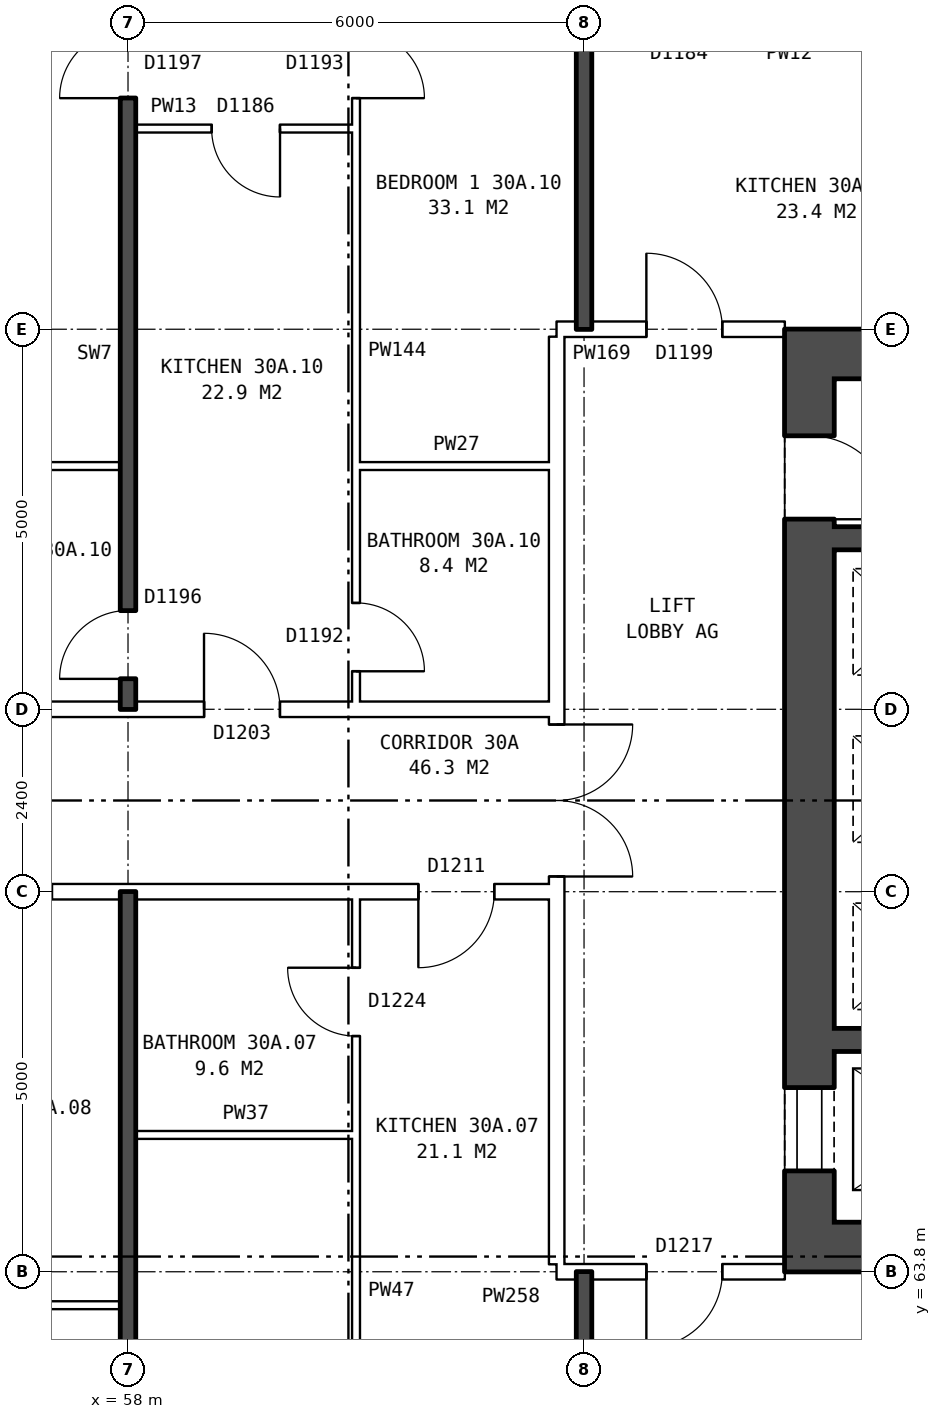
"""IFC4 building model, lengths in metres.
Left out: names, types, materials, properties, quantities, classifications, styles, units other than length and angle.
Written with IfcOpenShell. Run it as: python <this file> out.ifc"""

import sys

from ifc_helpers import new_model, si_unit, direction, frame, frame_2d, origin, place, context, subcontext, project, spatial, rectangle, extrude, element, fill, save


model = new_model("IFC4")
c1 = context("Model", 3, precision=1e-05, world=origin(), true_north=direction((0.0, 1.0)))
c2 = subcontext(c1, "Body", "Model", "MODEL_VIEW")
j1 = project(units=[si_unit("LENGTHUNIT", "METRE"), si_unit("PLANEANGLEUNIT", "RADIAN")], contexts=[c1])
p1 = place(None, origin())
s1 = spatial("IfcSite", under=j1, at=p1, CompositionType="ELEMENT")
p2 = place(p1, origin())
s2 = spatial("IfcBuilding", under=s1, at=p2, CompositionType="ELEMENT")
p3 = place(p2, frame((0.0, 0.0, 108.8)))
s3 = spatial("IfcBuildingStorey", under=s2, at=p3, CompositionType="ELEMENT", Elevation=108.8)
p4 = place(p3, frame((66.965, 64.45, 0.0), z_axis=(0.0, 0.0, 1.0), x_axis=(0.0, 1.0, 0.0)))
e1 = element("IfcWall", 1, at=p4, inside=s3, PredefinedType="SHEAR", context=c2, shape_type="SweptSolid", body=[
    extrude(rectangle(XDim=11.1, YDim=0.65, at=frame_2d((5.55, 0.0))), origin(), (0.0, 0.0, 1.0), 2.85),
])
p5 = place(p4, frame((0.675, 0.0, 0.0)))
e2 = element("IfcOpeningElement", 2, at=p5, cuts=e1, PredefinedType="OPENING", context=c2, shape_type="SweptSolid", body=[
    extrude(rectangle(XDim=1.1, YDim=2.1, at=frame_2d((0.55, 1.05))), frame((0.0, 0.335, 0.0), z_axis=(0.0, -1.0, 0.0), x_axis=(1.0, 0.0, 0.0)), (0.0, 0.0, 1.0), 0.67),
])
p6 = place(p4, frame((9.25, 0.0, 0.0)))
e3 = element("IfcOpeningElement", 3, at=p6, cuts=e1, PredefinedType="OPENING", context=c2, shape_type="SweptSolid", body=[
    extrude(rectangle(XDim=1.1, YDim=2.1, at=frame_2d((0.55, 1.05))), frame((0.0, 0.335, 0.0), z_axis=(0.0, -1.0, 0.0), x_axis=(1.0, 0.0, 0.0)), (0.0, 0.0, 1.0), 0.67),
])
for number, where, z_axis, x_axis in (
    (4, (66.64, 64.125, 0.0), (0.0, 0.0, 1.0), (1.0, 0.0, 0.0)),
    (5, (66.64, 75.875, 0.0), (0.0, 0.0, 1.0), (1.0, 0.0, 0.0)),
):
    element("IfcWall", number, at=place(p3, frame(where, z_axis=z_axis, x_axis=x_axis)), inside=s3, PredefinedType="SHEAR", context=c2, shape_type="SweptSolid", body=[
        extrude(rectangle(XDim=9.0, YDim=0.65, at=frame_2d((4.5, 0.0))), origin(), (0.0, 0.0, 1.0), 2.85),
    ])
p7 = place(p3, frame((67.29, 66.85, 0.0), z_axis=(0.0, 0.0, 1.0), x_axis=(1.0, 0.0, 0.0)))
e6 = element("IfcWall", 6, at=p7, inside=s3, PredefinedType="SHEAR", context=c2, shape_type="SweptSolid", body=[
    extrude(rectangle(XDim=3.37, YDim=0.3, at=frame_2d((1.685, 0.0))), origin(), (0.0, 0.0, 1.0), 2.85),
])
p8 = place(p3, frame((67.29, 73.45, 0.0), z_axis=(0.0, 0.0, 1.0), x_axis=(1.0, 0.0, 0.0)))
e7 = element("IfcWall", 7, at=p8, inside=s3, PredefinedType="SHEAR", context=c2, shape_type="SweptSolid", body=[
    extrude(rectangle(XDim=2.25, YDim=0.3, at=frame_2d((1.125, 0.0))), origin(), (0.0, 0.0, 1.0), 2.85),
])
p9 = place(p3, frame((63.64, 63.9, 0.0), z_axis=(0.0, 0.0, 1.0), x_axis=(0.0, 1.0, 0.0)))
e8 = element("IfcWall", 8, at=p9, inside=s3, PredefinedType="PARTITIONING", context=c2, shape_type="SweptSolid", body=[
    extrude(rectangle(XDim=12.2, YDim=0.2, at=frame_2d((6.1, 0.0))), origin(), (0.0, 0.0, 1.0), 2.85),
])
p10 = place(p9, frame((5.1, 0.0, 0.0)))
e9 = element("IfcOpeningElement", 9, at=p10, cuts=e8, PredefinedType="OPENING", context=c2, shape_type="SweptSolid", body=[
    extrude(rectangle(XDim=2.0, YDim=2.1, at=frame_2d((1.0, 1.05))), frame((0.0, 0.11, 0.0), z_axis=(0.0, -1.0, 0.0), x_axis=(1.0, 0.0, 0.0)), (0.0, 0.0, 1.0), 0.22),
])
p11 = place(p3, frame((55.0, 63.36, 0.0), z_axis=(0.0, 0.0, 1.0), x_axis=(1.0, 0.0, 0.0)))
e10 = element("IfcWall", 10, at=p11, inside=s3, PredefinedType="PARTITIONING", context=c2, shape_type="SweptSolid", body=[
    extrude(rectangle(XDim=2.9, YDim=0.1, at=frame_2d((1.45, 0.0))), origin(), (0.0, 0.0, 1.0), 2.85),
])
p12 = place(p11, frame((1.0, 0.0, 0.0)))
e11 = element("IfcOpeningElement", 11, at=p12, cuts=e10, PredefinedType="OPENING", context=c2, shape_type="SweptSolid", body=[
    extrude(rectangle(XDim=0.9, YDim=2.1, at=frame_2d((0.45, 1.05))), frame((0.0, 0.06, 0.0), z_axis=(0.0, -1.0, 0.0), x_axis=(1.0, 0.0, 0.0)), (0.0, 0.0, 1.0), 0.12),
])
p13 = place(p3, frame((63.64, 63.8, 0.0), z_axis=(0.0, 0.0, 1.0), x_axis=(1.0, 0.0, 0.0)))
e12 = element("IfcWall", 12, at=p13, inside=s3, PredefinedType="PARTITIONING", context=c2, shape_type="SweptSolid", body=[
    extrude(rectangle(XDim=3.0, YDim=0.2, at=frame_2d((1.5, 0.0))), origin(), (0.0, 0.0, 1.0), 2.85),
])
p14 = place(p13, frame((1.18, 0.0, 0.0)))
e13 = element("IfcOpeningElement", 13, at=p14, cuts=e12, PredefinedType="OPENING", context=c2, shape_type="SweptSolid", body=[
    extrude(rectangle(XDim=1.0, YDim=2.1, at=frame_2d((0.5, 1.05))), frame((0.0, 0.11, 0.0), z_axis=(0.0, -1.0, 0.0), x_axis=(1.0, 0.0, 0.0)), (0.0, 0.0, 1.0), 0.22),
])
p15 = place(p3, frame((58.1, 65.6, 0.0), z_axis=(0.0, 0.0, 1.0), x_axis=(1.0, 0.0, 0.0)))
e14 = element("IfcWall", 14, at=p15, inside=s3, PredefinedType="PARTITIONING", context=c2, shape_type="SweptSolid", body=[
    extrude(rectangle(XDim=2.9, YDim=0.1, at=frame_2d((1.45, 0.0))), origin(), (0.0, 0.0, 1.0), 2.85),
])
p16 = place(p3, frame((44.36, 68.8, 0.0), z_axis=(0.0, 0.0, 1.0), x_axis=(1.0, 0.0, 0.0)))
e15 = element("IfcWall", 15, at=p16, inside=s3, PredefinedType="PARTITIONING", context=c2, shape_type="SweptSolid", body=[
    extrude(rectangle(XDim=19.28, YDim=0.2, at=frame_2d((9.64, 0.0))), origin(), (0.0, 0.0, 1.0), 2.85),
])
p17 = place(p16, frame((17.46, 0.0, 0.0)))
e16 = element("IfcOpeningElement", 16, at=p17, cuts=e15, PredefinedType="OPENING", context=c2, shape_type="SweptSolid", body=[
    extrude(rectangle(XDim=1.0, YDim=2.1, at=frame_2d((0.5, 1.05))), frame((0.0, 0.11, 0.0), z_axis=(0.0, -1.0, 0.0), x_axis=(1.0, 0.0, 0.0)), (0.0, 0.0, 1.0), 0.22),
])
p18 = place(p16, frame((11.64, 0.0, 0.0)))
e17 = element("IfcOpeningElement", 17, at=p18, cuts=e15, PredefinedType="OPENING", context=c2, shape_type="SweptSolid", body=[
    extrude(rectangle(XDim=1.0, YDim=2.1, at=frame_2d((0.5, 1.05))), frame((0.0, 0.11, 0.0), z_axis=(0.0, -1.0, 0.0), x_axis=(1.0, 0.0, 0.0)), (0.0, 0.0, 1.0), 0.22),
])
p19 = place(p16, frame((2.64, 0.0, 0.0)))
e18 = element("IfcOpeningElement", 18, at=p19, cuts=e15, PredefinedType="OPENING", context=c2, shape_type="SweptSolid", body=[
    extrude(rectangle(XDim=1.0, YDim=2.1, at=frame_2d((0.5, 1.05))), frame((0.0, 0.11, 0.0), z_axis=(0.0, -1.0, 0.0), x_axis=(1.0, 0.0, 0.0)), (0.0, 0.0, 1.0), 0.22),
])
p20 = place(p3, frame((44.36, 71.2, 0.0), z_axis=(0.0, 0.0, 1.0), x_axis=(1.0, 0.0, 0.0)))
e19 = element("IfcWall", 19, at=p20, inside=s3, PredefinedType="PARTITIONING", context=c2, shape_type="SweptSolid", body=[
    extrude(rectangle(XDim=19.28, YDim=0.2, at=frame_2d((9.64, 0.0))), origin(), (0.0, 0.0, 1.0), 2.85),
])
p21 = place(p20, frame((14.64, 0.0, 0.0)))
e20 = element("IfcOpeningElement", 20, at=p21, cuts=e19, PredefinedType="OPENING", context=c2, shape_type="SweptSolid", body=[
    extrude(rectangle(XDim=1.0, YDim=2.1, at=frame_2d((0.5, 1.05))), frame((0.0, 0.11, 0.0), z_axis=(0.0, -1.0, 0.0), x_axis=(1.0, 0.0, 0.0)), (0.0, 0.0, 1.0), 0.22),
])
p22 = place(p20, frame((5.64, 0.0, 0.0)))
e21 = element("IfcOpeningElement", 21, at=p22, cuts=e19, PredefinedType="OPENING", context=c2, shape_type="SweptSolid", body=[
    extrude(rectangle(XDim=1.0, YDim=2.1, at=frame_2d((0.5, 1.05))), frame((0.0, 0.11, 0.0), z_axis=(0.0, -1.0, 0.0), x_axis=(1.0, 0.0, 0.0)), (0.0, 0.0, 1.0), 0.22),
])
p23 = place(p3, frame((55.1, 74.4, 0.0), z_axis=(0.0, 0.0, 1.0), x_axis=(1.0, 0.0, 0.0)))
e22 = element("IfcWall", 22, at=p23, inside=s3, PredefinedType="PARTITIONING", context=c2, shape_type="SweptSolid", body=[
    extrude(rectangle(XDim=2.8, YDim=0.1, at=frame_2d((1.4, 0.0))), origin(), (0.0, 0.0, 1.0), 2.85),
])
p24 = place(p3, frame((61.0, 74.4, 0.0), z_axis=(0.0, 0.0, 1.0), x_axis=(1.0, 0.0, 0.0)))
e23 = element("IfcWall", 23, at=p24, inside=s3, PredefinedType="PARTITIONING", context=c2, shape_type="SweptSolid", body=[
    extrude(rectangle(XDim=2.64, YDim=0.1, at=frame_2d((1.32, 0.0))), origin(), (0.0, 0.0, 1.0), 2.85),
])
p25 = place(p3, frame((63.64, 76.2, 0.0), z_axis=(0.0, 0.0, 1.0), x_axis=(1.0, 0.0, 0.0)))
e24 = element("IfcWall", 24, at=p25, inside=s3, PredefinedType="PARTITIONING", context=c2, shape_type="SweptSolid", body=[
    extrude(rectangle(XDim=3.0, YDim=0.2, at=frame_2d((1.5, 0.0))), origin(), (0.0, 0.0, 1.0), 2.85),
])
p26 = place(p25, frame((1.18, 0.0, 0.0)))
e25 = element("IfcOpeningElement", 25, at=p26, cuts=e24, PredefinedType="OPENING", context=c2, shape_type="SweptSolid", body=[
    extrude(rectangle(XDim=1.0, YDim=2.1, at=frame_2d((0.5, 1.05))), frame((0.0, 0.11, 0.0), z_axis=(0.0, -1.0, 0.0), x_axis=(1.0, 0.0, 0.0)), (0.0, 0.0, 1.0), 0.22),
])
p27 = place(p3, frame((58.1, 78.84, 0.0), z_axis=(0.0, 0.0, 1.0), x_axis=(1.0, 0.0, 0.0)))
e26 = element("IfcWall", 26, at=p27, inside=s3, PredefinedType="PARTITIONING", context=c2, shape_type="SweptSolid", body=[
    extrude(rectangle(XDim=2.9, YDim=0.1, at=frame_2d((1.45, 0.0))), origin(), (0.0, 0.0, 1.0), 2.85),
])
p28 = place(p27, frame((1.0, 0.0, 0.0)))
e27 = element("IfcOpeningElement", 27, at=p28, cuts=e26, PredefinedType="OPENING", context=c2, shape_type="SweptSolid", body=[
    extrude(rectangle(XDim=0.9, YDim=2.1, at=frame_2d((0.45, 1.05))), frame((0.0, 0.06, 0.0), z_axis=(0.0, -1.0, 0.0), x_axis=(1.0, 0.0, 0.0)), (0.0, 0.0, 1.0), 0.12),
])
p29 = place(p3, frame((58.0, 54.36, 0.0), z_axis=(0.0, 0.0, 1.0), x_axis=(0.0, 1.0, 0.0)))
e28 = element("IfcWall", 28, at=p29, inside=s3, PredefinedType="SOLIDWALL", context=c2, shape_type="SweptSolid", body=[
    extrude(rectangle(XDim=14.44, YDim=0.2, at=frame_2d((7.22, 0.0))), origin(), (0.0, 0.0, 1.0), 2.85),
])
p30 = place(p3, frame((58.0, 71.2, 0.0), z_axis=(0.0, 0.0, 1.0), x_axis=(0.0, 1.0, 0.0)))
e29 = element("IfcWall", 29, at=p30, inside=s3, PredefinedType="SOLIDWALL", context=c2, shape_type="SweptSolid", body=[
    extrude(rectangle(XDim=14.44, YDim=0.2, at=frame_2d((7.22, 0.0))), origin(), (0.0, 0.0, 1.0), 2.85),
])
p31 = place(p30, frame((8.04, 0.0, 0.0)))
e30 = element("IfcOpeningElement", 30, at=p31, cuts=e29, PredefinedType="OPENING", context=c2, shape_type="SweptSolid", body=[
    extrude(rectangle(XDim=0.9, YDim=2.1, at=frame_2d((0.45, 1.05))), frame((0.0, 0.11, 0.0), z_axis=(0.0, -1.0, 0.0), x_axis=(1.0, 0.0, 0.0)), (0.0, 0.0, 1.0), 0.22),
])
p32 = place(p30, frame((0.4, 0.0, 0.0)))
e31 = element("IfcOpeningElement", 31, at=p32, cuts=e29, PredefinedType="OPENING", context=c2, shape_type="SweptSolid", body=[
    extrude(rectangle(XDim=0.9, YDim=2.1, at=frame_2d((0.45, 1.05))), frame((0.0, 0.11, 0.0), z_axis=(0.0, -1.0, 0.0), x_axis=(1.0, 0.0, 0.0)), (0.0, 0.0, 1.0), 0.22),
])
p33 = place(p3, frame((61.0, 54.36, 0.0), z_axis=(0.0, 0.0, 1.0), x_axis=(0.0, 1.0, 0.0)))
e32 = element("IfcWall", 32, at=p33, inside=s3, PredefinedType="PARTITIONING", context=c2, shape_type="SweptSolid", body=[
    extrude(rectangle(XDim=14.34, YDim=0.1, at=frame_2d((7.17, 0.0))), origin(), (0.0, 0.0, 1.0), 2.85),
])
p34 = place(p33, frame((5.5, 0.0, 0.0)))
e33 = element("IfcOpeningElement", 33, at=p34, cuts=e32, PredefinedType="OPENING", context=c2, shape_type="SweptSolid", body=[
    extrude(rectangle(XDim=0.9, YDim=2.1, at=frame_2d((0.45, 1.05))), frame((0.0, 0.06, 0.0), z_axis=(0.0, -1.0, 0.0), x_axis=(1.0, 0.0, 0.0)), (0.0, 0.0, 1.0), 0.12),
])
p35 = place(p33, frame((12.54, 0.0, 0.0)))
e34 = element("IfcOpeningElement", 34, at=p35, cuts=e32, PredefinedType="OPENING", context=c2, shape_type="SweptSolid", body=[
    extrude(rectangle(XDim=0.9, YDim=2.1, at=frame_2d((0.45, 1.05))), frame((0.0, 0.06, 0.0), z_axis=(0.0, -1.0, 0.0), x_axis=(1.0, 0.0, 0.0)), (0.0, 0.0, 1.0), 0.12),
])
p36 = place(p3, frame((61.0, 71.3, 0.0), z_axis=(0.0, 0.0, 1.0), x_axis=(0.0, 1.0, 0.0)))
e35 = element("IfcWall", 35, at=p36, inside=s3, PredefinedType="PARTITIONING", context=c2, shape_type="SweptSolid", body=[
    extrude(rectangle(XDim=14.34, YDim=0.1, at=frame_2d((7.17, 0.0))), origin(), (0.0, 0.0, 1.0), 2.85),
])
p37 = place(p36, frame((7.94, 0.0, 0.0)))
e36 = element("IfcOpeningElement", 36, at=p37, cuts=e35, PredefinedType="OPENING", context=c2, shape_type="SweptSolid", body=[
    extrude(rectangle(XDim=0.9, YDim=2.1, at=frame_2d((0.45, 1.05))), frame((0.0, 0.06, 0.0), z_axis=(0.0, -1.0, 0.0), x_axis=(1.0, 0.0, 0.0)), (0.0, 0.0, 1.0), 0.12),
])
p38 = place(p36, frame((0.4, 0.0, 0.0)))
e37 = element("IfcOpeningElement", 37, at=p38, cuts=e35, PredefinedType="OPENING", context=c2, shape_type="SweptSolid", body=[
    extrude(rectangle(XDim=0.9, YDim=2.1, at=frame_2d((0.45, 1.05))), frame((0.0, 0.06, 0.0), z_axis=(0.0, -1.0, 0.0), x_axis=(1.0, 0.0, 0.0)), (0.0, 0.0, 1.0), 0.12),
])
for number, where, z_axis, x_axis in (
    (38, (64.0, 54.36, 0.0), (0.0, 0.0, 1.0), (0.0, 1.0, 0.0)),
    (39, (64.0, 76.2, 0.0), (0.0, 0.0, 1.0), (0.0, 1.0, 0.0)),
):
    element("IfcWall", number, at=place(p3, frame(where, z_axis=z_axis, x_axis=x_axis)), inside=s3, PredefinedType="SOLIDWALL", context=c2, shape_type="SweptSolid", body=[
        extrude(rectangle(XDim=9.44, YDim=0.2, at=frame_2d((4.72, 0.0))), origin(), (0.0, 0.0, 1.0), 2.85),
    ])
p39 = place(p5, origin())
e40 = element("IfcDoor", 40, at=p39, inside=s3, OperationType="DOUBLE_DOOR_SLIDING", PredefinedType="DOOR", context=c2, shape_type="SweptSolid", body=[
    extrude(rectangle(XDim=1.1, YDim=2.1, at=frame_2d((0.55, 1.05))), frame((0.0, -0.26, 0.0), z_axis=(0.0, -1.0, 0.0), x_axis=(1.0, 0.0, 0.0)), (0.0, 0.0, 1.0), 0.05),
])
fill(e2, e40)
p40 = place(p6, frame((1.1, 0.0, 0.0), z_axis=(0.0, 0.0, 1.0), x_axis=(-1.0, 0.0, 0.0)))
e41 = element("IfcDoor", 41, at=p40, inside=s3, OperationType="SINGLE_SWING_RIGHT", PredefinedType="DOOR", context=c2, shape_type="SweptSolid", body=[
    extrude(rectangle(XDim=1.1, YDim=2.1, at=frame_2d((0.55, 1.05))), frame((0.0, 0.31, 0.0), z_axis=(0.0, -1.0, 0.0), x_axis=(1.0, 0.0, 0.0)), (0.0, 0.0, 1.0), 0.05),
])
fill(e3, e41)
p41 = place(p10, frame((2.0, 0.0, 0.0), z_axis=(0.0, 0.0, 1.0), x_axis=(-1.0, 0.0, 0.0)))
e42 = element("IfcDoor", 42, at=p41, inside=s3, OperationType="DOUBLE_DOOR_SINGLE_SWING", PredefinedType="DOOR", context=c2, shape_type="SweptSolid", body=[
    extrude(rectangle(XDim=2.0, YDim=2.1, at=frame_2d((1.0, 1.05))), frame((0.0, 0.025, 0.0), z_axis=(0.0, -1.0, 0.0), x_axis=(1.0, 0.0, 0.0)), (0.0, 0.0, 1.0), 0.05),
])
fill(e9, e42)
p42 = place(p14, frame((1.0, 0.0, 0.0), z_axis=(0.0, 0.0, 1.0), x_axis=(-1.0, 0.0, 0.0)))
e43 = element("IfcDoor", 43, at=p42, inside=s3, OperationType="SINGLE_SWING_RIGHT", PredefinedType="DOOR", context=c2, shape_type="SweptSolid", body=[
    extrude(rectangle(XDim=1.0, YDim=2.1, at=frame_2d((0.5, 1.05))), frame((0.0, 0.025, 0.0), z_axis=(0.0, -1.0, 0.0), x_axis=(1.0, 0.0, 0.0)), (0.0, 0.0, 1.0), 0.05),
])
fill(e13, e43)
p43 = place(p26, origin())
e44 = element("IfcDoor", 44, at=p43, inside=s3, OperationType="SINGLE_SWING_LEFT", PredefinedType="DOOR", context=c2, shape_type="SweptSolid", body=[
    extrude(rectangle(XDim=1.0, YDim=2.1, at=frame_2d((0.5, 1.05))), frame((0.0, 0.025, 0.0), z_axis=(0.0, -1.0, 0.0), x_axis=(1.0, 0.0, 0.0)), (0.0, 0.0, 1.0), 0.05),
])
fill(e25, e44)
p44 = place(p17, frame((1.0, 0.0, 0.0), z_axis=(0.0, 0.0, 1.0), x_axis=(-1.0, 0.0, 0.0)))
e45 = element("IfcDoor", 45, at=p44, inside=s3, OperationType="SINGLE_SWING_RIGHT", PredefinedType="DOOR", context=c2, shape_type="SweptSolid", body=[
    extrude(rectangle(XDim=1.0, YDim=2.1, at=frame_2d((0.5, 1.05))), frame((0.0, 0.025, 0.0), z_axis=(0.0, -1.0, 0.0), x_axis=(1.0, 0.0, 0.0)), (0.0, 0.0, 1.0), 0.05),
])
fill(e16, e45)
p45 = place(p35, origin())
e46 = element("IfcDoor", 46, at=p45, inside=s3, OperationType="SINGLE_SWING_RIGHT", PredefinedType="DOOR", context=c2, shape_type="SweptSolid", body=[
    extrude(rectangle(XDim=0.9, YDim=2.1, at=frame_2d((0.45, 1.05))), frame((0.0, 0.025, 0.0), z_axis=(0.0, -1.0, 0.0), x_axis=(1.0, 0.0, 0.0)), (0.0, 0.0, 1.0), 0.05),
])
fill(e34, e46)
p46 = place(p37, frame((0.9, 0.0, 0.0), z_axis=(0.0, 0.0, 1.0), x_axis=(-1.0, 0.0, 0.0)))
e47 = element("IfcDoor", 47, at=p46, inside=s3, OperationType="SINGLE_SWING_RIGHT", PredefinedType="DOOR", context=c2, shape_type="SweptSolid", body=[
    extrude(rectangle(XDim=0.9, YDim=2.1, at=frame_2d((0.45, 1.05))), frame((0.0, 0.025, 0.0), z_axis=(0.0, -1.0, 0.0), x_axis=(1.0, 0.0, 0.0)), (0.0, 0.0, 1.0), 0.05),
])
fill(e36, e47)
p47 = place(p31, origin())
e48 = element("IfcDoor", 48, at=p47, inside=s3, OperationType="SINGLE_SWING_LEFT", PredefinedType="DOOR", context=c2, shape_type="SweptSolid", body=[
    extrude(rectangle(XDim=0.9, YDim=2.1, at=frame_2d((0.45, 1.05))), frame((0.0, 0.025, 0.0), z_axis=(0.0, -1.0, 0.0), x_axis=(1.0, 0.0, 0.0)), (0.0, 0.0, 1.0), 0.05),
])
fill(e30, e48)
p48 = place(p21, origin())
e49 = element("IfcDoor", 49, at=p48, inside=s3, OperationType="SINGLE_SWING_LEFT", PredefinedType="DOOR", context=c2, shape_type="SweptSolid", body=[
    extrude(rectangle(XDim=1.0, YDim=2.1, at=frame_2d((0.5, 1.05))), frame((0.0, 0.025, 0.0), z_axis=(0.0, -1.0, 0.0), x_axis=(1.0, 0.0, 0.0)), (0.0, 0.0, 1.0), 0.05),
])
fill(e20, e49)
p49 = place(p28, frame((0.9, 0.0, 0.0), z_axis=(0.0, 0.0, 1.0), x_axis=(-1.0, 0.0, 0.0)))
e50 = element("IfcDoor", 50, at=p49, inside=s3, OperationType="SINGLE_SWING_LEFT", PredefinedType="DOOR", context=c2, shape_type="SweptSolid", body=[
    extrude(rectangle(XDim=0.9, YDim=2.1, at=frame_2d((0.45, 1.05))), frame((0.0, 0.025, 0.0), z_axis=(0.0, -1.0, 0.0), x_axis=(1.0, 0.0, 0.0)), (0.0, 0.0, 1.0), 0.05),
])
fill(e27, e50)
p50 = place(p38, frame((0.9, 0.0, 0.0), z_axis=(0.0, 0.0, 1.0), x_axis=(-1.0, 0.0, 0.0)))
e51 = element("IfcDoor", 51, at=p50, inside=s3, OperationType="SINGLE_SWING_RIGHT", PredefinedType="DOOR", context=c2, shape_type="SweptSolid", body=[
    extrude(rectangle(XDim=0.9, YDim=2.1, at=frame_2d((0.45, 1.05))), frame((0.0, 0.025, 0.0), z_axis=(0.0, -1.0, 0.0), x_axis=(1.0, 0.0, 0.0)), (0.0, 0.0, 1.0), 0.05),
])
fill(e37, e51)
p51 = place(p32, origin())
e52 = element("IfcDoor", 52, at=p51, inside=s3, OperationType="SINGLE_SWING_LEFT", PredefinedType="DOOR", context=c2, shape_type="SweptSolid", body=[
    extrude(rectangle(XDim=0.9, YDim=2.1, at=frame_2d((0.45, 1.05))), frame((0.0, 0.025, 0.0), z_axis=(0.0, -1.0, 0.0), x_axis=(1.0, 0.0, 0.0)), (0.0, 0.0, 1.0), 0.05),
])
fill(e31, e52)
save(model, sys.argv[1])
